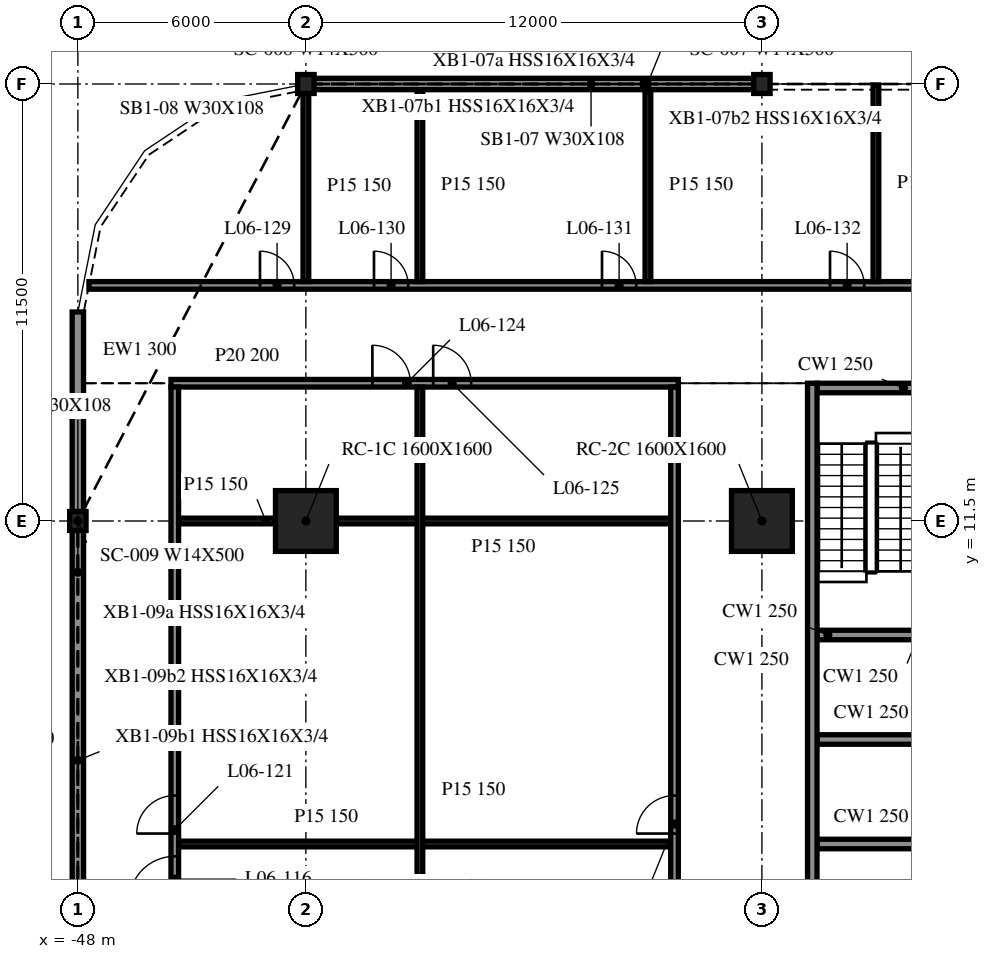
"""IFC4 building model, lengths in metres.
Left out: names, types, materials, properties, quantities, classifications, styles, units other than length and angle.
Written with IfcOpenShell. Run it as: python <this file> out.ifc"""

import sys

from ifc_helpers import new_model, si_unit, direction, frame, frame_2d, origin, origin_2d, place, context, subcontext, project, spatial, rectangle, i_section, extrude, element, fill, save


model = new_model("IFC4")
c1 = context("Model", 3, precision=1e-05, world=origin(), true_north=direction((0.0, 1.0)))
c2 = subcontext(c1, "Body", "Model", "MODEL_VIEW")
j1 = project(units=[si_unit("LENGTHUNIT", "METRE"), si_unit("PLANEANGLEUNIT", "RADIAN")], contexts=[c1])
p1 = place(None, origin())
s1 = spatial("IfcSite", under=j1, at=p1, CompositionType="ELEMENT")
p2 = place(p1, origin())
s2 = spatial("IfcBuilding", under=s1, at=p2, CompositionType="ELEMENT")
p3 = place(p2, frame((0.0, 0.0, 28.7)))
s3 = spatial("IfcBuildingStorey", under=s2, at=p3, CompositionType="ELEMENT", Elevation=28.7)
for number, where, z_axis, x_axis in (
    (1, (-42.0, 11.5, -0.34), (0.0, 0.0, 1.0), (1.0, 0.0, 0.0)),
    (2, (-30.0, 11.5, -0.34), (0.0, 0.0, 1.0), (1.0, 0.0, 0.0)),
):
    element("IfcColumn", number, at=place(p3, frame(where, z_axis=z_axis, x_axis=x_axis)), inside=s3, PredefinedType="COLUMN", context=c2, shape_type="SweptSolid", body=[
        extrude(rectangle(XDim=1.6, YDim=1.6, at=origin_2d()), origin(), (0.0, 0.0, 1.0), 4.3),
    ])
for number, where, z_axis, x_axis in (
    (3, (-30.0, 23.0, -0.34), (0.0, 0.0, 1.0), (1.0, 0.0, 0.0)),
    (4, (-42.0, 23.0, -0.34), (0.0, 0.0, 1.0), (1.0, 0.0, 0.0)),
    (5, (-48.0, 11.5, -0.34), (0.0, 0.0, 1.0), (1.0, 0.0, 0.0)),
):
    element("IfcColumn", number, at=place(p3, frame(where, z_axis=z_axis, x_axis=x_axis)), inside=s3, PredefinedType="COLUMN", context=c2, shape_type="SweptSolid", body=[
        extrude(i_section(OverallWidth=0.432, OverallDepth=0.498, WebThickness=0.056, FlangeThickness=0.089, at=origin_2d()), origin(), (0.0, 0.0, 1.0), 4.3),
    ])
p4 = place(p3, frame((-30.028, 23.0, 0.0), z_axis=(0.0, 0.0, 1.0), x_axis=(-1.0, 0.0, 0.0)))
e6 = element("IfcWall", 6, at=p4, inside=s3, PredefinedType="NOTDEFINED", context=c2, shape_type="SweptSolid", body=[
    extrude(rectangle(XDim=11.944, YDim=0.3, at=frame_2d((5.972, 0.0))), origin(), (0.0, 0.0, 1.0), 3.203),
])
p5 = place(p3, frame((-48.0, 17.0, 0.0), z_axis=(0.0, 0.0, 1.0), x_axis=(0.0, -1.0, 0.0)))
e7 = element("IfcWall", 7, at=p5, inside=s3, PredefinedType="NOTDEFINED", context=c2, shape_type="SweptSolid", body=[
    extrude(rectangle(XDim=5.251, YDim=0.3, at=frame_2d((2.625, 0.0))), origin(), (0.0, 0.0, 1.0), 3.203),
])
p6 = place(p3, frame((-48.0, 11.251, 0.0), z_axis=(0.0, 0.0, 1.0), x_axis=(0.0, -1.0, 0.0)))
e8 = element("IfcWall", 8, at=p6, inside=s3, PredefinedType="NOTDEFINED", context=c2, shape_type="SweptSolid", body=[
    extrude(rectangle(XDim=11.002, YDim=0.3, at=frame_2d((5.501, 0.0))), origin(), (0.0, 0.0, 1.0), 3.203),
])
p7 = place(p3, frame((-28.675, 15.125, 0.0), z_axis=(0.0, 0.0, 1.0), x_axis=(0.0, -1.0, 0.0)))
e9 = element("IfcWall", 9, at=p7, inside=s3, PredefinedType="SOLIDWALL", context=c2, shape_type="SweptSolid", body=[
    extrude(rectangle(XDim=24.25, YDim=0.25, at=frame_2d((12.125, 0.0))), origin(), (0.0, 0.0, 1.0), 3.96),
])
p8 = place(p3, frame((-28.55, 15.0, 0.0), z_axis=(0.0, 0.0, 1.0), x_axis=(1.0, 0.0, 0.0)))
e10 = element("IfcWall", 10, at=p8, inside=s3, PredefinedType="SOLIDWALL", context=c2, shape_type="SweptSolid", body=[
    extrude(rectangle(XDim=9.1, YDim=0.25, at=frame_2d((4.55, 0.0))), origin(), (0.0, 0.0, 1.0), 3.96),
])
p9 = place(p8, frame((3.65, 0.0, 0.0)))
e11 = element("IfcOpeningElement", 11, at=p9, cuts=e10, PredefinedType="OPENING", context=c2, shape_type="SweptSolid", body=[
    extrude(rectangle(XDim=1.8, YDim=2.1, at=frame_2d((0.9, 1.05))), frame((0.0, 0.135, 0.0), z_axis=(0.0, -1.0, 0.0), x_axis=(1.0, 0.0, 0.0)), (0.0, 0.0, 1.0), 0.27),
])
for number, where, z_axis, x_axis in (
    (12, (-28.55, 3.0, 0.0), (0.0, 0.0, 1.0), (1.0, 0.0, 0.0)),
    (13, (-28.55, 5.75, 0.0), (0.0, 0.0, 1.0), (1.0, 0.0, 0.0)),
    (14, (-28.55, 8.5, 0.0), (0.0, 0.0, 1.0), (1.0, 0.0, 0.0)),
):
    element("IfcWall", number, at=place(p3, frame(where, z_axis=z_axis, x_axis=x_axis)), inside=s3, PredefinedType="SOLIDWALL", context=c2, shape_type="SweptSolid", body=[
        extrude(rectangle(XDim=2.85, YDim=0.25, at=frame_2d((1.425, 0.0))), origin(), (0.0, 0.0, 1.0), 3.96),
    ])
p10 = place(p3, frame((-45.35, 3.0, 0.0), z_axis=(0.0, 0.0, 1.0), x_axis=(1.0, 0.0, 0.0)))
e15 = element("IfcWall", 15, at=p10, inside=s3, PredefinedType="PARTITIONING", context=c2, shape_type="SweptSolid", body=[
    extrude(rectangle(XDim=12.95, YDim=0.15, at=frame_2d((6.475, 0.0))), origin(), (0.0, 0.0, 1.0), 3.96),
])
p11 = place(p3, frame((-45.35, 11.5, 0.0), z_axis=(0.0, 0.0, 1.0), x_axis=(1.0, 0.0, 0.0)))
e16 = element("IfcWall", 16, at=p11, inside=s3, PredefinedType="PARTITIONING", context=c2, shape_type="SweptSolid", body=[
    extrude(rectangle(XDim=2.55, YDim=0.15, at=frame_2d((1.275, 0.0))), origin(), (0.0, 0.0, 1.0), 3.96),
])
p12 = place(p3, frame((-41.2, 11.5, 0.0), z_axis=(0.0, 0.0, 1.0), x_axis=(1.0, 0.0, 0.0)))
e17 = element("IfcWall", 17, at=p12, inside=s3, PredefinedType="PARTITIONING", context=c2, shape_type="SweptSolid", body=[
    extrude(rectangle(XDim=8.8, YDim=0.15, at=frame_2d((4.4, 0.0))), origin(), (0.0, 0.0, 1.0), 3.96),
])
p13 = place(p3, frame((-45.55, 15.125, 0.0), z_axis=(0.0, 0.0, 1.0), x_axis=(1.0, 0.0, 0.0)))
e18 = element("IfcWall", 18, at=p13, inside=s3, PredefinedType="PARTITIONING", context=c2, shape_type="SweptSolid", body=[
    extrude(rectangle(XDim=13.35, YDim=0.2, at=frame_2d((6.675, 0.0))), origin(), (0.0, 0.0, 1.0), 3.96),
])
p14 = place(p13, frame((5.3, 0.0, 0.0)))
e19 = element("IfcOpeningElement", 19, at=p14, cuts=e18, PredefinedType="OPENING", context=c2, shape_type="SweptSolid", body=[
    extrude(rectangle(XDim=1.0, YDim=2.1, at=frame_2d((0.5, 1.05))), frame((0.0, 0.11, 0.0), z_axis=(0.0, -1.0, 0.0), x_axis=(1.0, 0.0, 0.0)), (0.0, 0.0, 1.0), 0.22),
])
p15 = place(p13, frame((6.9, 0.0, 0.0)))
e20 = element("IfcOpeningElement", 20, at=p15, cuts=e18, PredefinedType="OPENING", context=c2, shape_type="SweptSolid", body=[
    extrude(rectangle(XDim=1.0, YDim=2.1, at=frame_2d((0.5, 1.05))), frame((0.0, 0.11, 0.0), z_axis=(0.0, -1.0, 0.0), x_axis=(1.0, 0.0, 0.0)), (0.0, 0.0, 1.0), 0.22),
])
p16 = place(p3, frame((-47.708, 17.7, 0.0), z_axis=(0.0, 0.0, 1.0), x_axis=(1.0, 0.0, 0.0)))
e21 = element("IfcWall", 21, at=p16, inside=s3, PredefinedType="PARTITIONING", context=c2, shape_type="SweptSolid", body=[
    extrude(rectangle(XDim=95.416, YDim=0.2, at=frame_2d((47.708, 0.0))), origin(), (0.0, 0.0, 1.0), 3.96),
])
p17 = place(p16, frame((4.5, 0.0, 0.0)))
e22 = element("IfcOpeningElement", 22, at=p17, cuts=e21, PredefinedType="OPENING", context=c2, shape_type="SweptSolid", body=[
    extrude(rectangle(XDim=0.9, YDim=2.1, at=frame_2d((0.45, 1.05))), frame((0.0, 0.11, 0.0), z_axis=(0.0, -1.0, 0.0), x_axis=(1.0, 0.0, 0.0)), (0.0, 0.0, 1.0), 0.22),
])
p18 = place(p16, frame((7.5, 0.0, 0.0)))
e23 = element("IfcOpeningElement", 23, at=p18, cuts=e21, PredefinedType="OPENING", context=c2, shape_type="SweptSolid", body=[
    extrude(rectangle(XDim=0.9, YDim=2.1, at=frame_2d((0.45, 1.05))), frame((0.0, 0.11, 0.0), z_axis=(0.0, -1.0, 0.0), x_axis=(1.0, 0.0, 0.0)), (0.0, 0.0, 1.0), 0.22),
])
p19 = place(p16, frame((13.5, 0.0, 0.0)))
e24 = element("IfcOpeningElement", 24, at=p19, cuts=e21, PredefinedType="OPENING", context=c2, shape_type="SweptSolid", body=[
    extrude(rectangle(XDim=0.9, YDim=2.1, at=frame_2d((0.45, 1.05))), frame((0.0, 0.11, 0.0), z_axis=(0.0, -1.0, 0.0), x_axis=(1.0, 0.0, 0.0)), (0.0, 0.0, 1.0), 0.22),
])
p20 = place(p16, frame((19.5, 0.0, 0.0)))
e25 = element("IfcOpeningElement", 25, at=p20, cuts=e21, PredefinedType="OPENING", context=c2, shape_type="SweptSolid", body=[
    extrude(rectangle(XDim=0.9, YDim=2.1, at=frame_2d((0.45, 1.05))), frame((0.0, 0.11, 0.0), z_axis=(0.0, -1.0, 0.0), x_axis=(1.0, 0.0, 0.0)), (0.0, 0.0, 1.0), 0.22),
])
p21 = place(p16, frame((28.5, 0.0, 0.0)))
e26 = element("IfcOpeningElement", 26, at=p21, cuts=e21, PredefinedType="OPENING", context=c2, shape_type="SweptSolid", body=[
    extrude(rectangle(XDim=0.9, YDim=2.1, at=frame_2d((0.45, 1.05))), frame((0.0, 0.11, 0.0), z_axis=(0.0, -1.0, 0.0), x_axis=(1.0, 0.0, 0.0)), (0.0, 0.0, 1.0), 0.22),
])
p22 = place(p16, frame((31.5, 0.0, 0.0)))
e27 = element("IfcOpeningElement", 27, at=p22, cuts=e21, PredefinedType="OPENING", context=c2, shape_type="SweptSolid", body=[
    extrude(rectangle(XDim=0.9, YDim=2.1, at=frame_2d((0.45, 1.05))), frame((0.0, 0.11, 0.0), z_axis=(0.0, -1.0, 0.0), x_axis=(1.0, 0.0, 0.0)), (0.0, 0.0, 1.0), 0.22),
])
p23 = place(p16, frame((34.5, 0.0, 0.0)))
e28 = element("IfcOpeningElement", 28, at=p23, cuts=e21, PredefinedType="OPENING", context=c2, shape_type="SweptSolid", body=[
    extrude(rectangle(XDim=0.9, YDim=2.1, at=frame_2d((0.45, 1.05))), frame((0.0, 0.11, 0.0), z_axis=(0.0, -1.0, 0.0), x_axis=(1.0, 0.0, 0.0)), (0.0, 0.0, 1.0), 0.22),
])
p24 = place(p16, frame((37.5, 0.0, 0.0)))
e29 = element("IfcOpeningElement", 29, at=p24, cuts=e21, PredefinedType="OPENING", context=c2, shape_type="SweptSolid", body=[
    extrude(rectangle(XDim=0.9, YDim=2.1, at=frame_2d((0.45, 1.05))), frame((0.0, 0.11, 0.0), z_axis=(0.0, -1.0, 0.0), x_axis=(1.0, 0.0, 0.0)), (0.0, 0.0, 1.0), 0.22),
])
p25 = place(p16, frame((43.5, 0.0, 0.0)))
e30 = element("IfcOpeningElement", 30, at=p25, cuts=e21, PredefinedType="OPENING", context=c2, shape_type="SweptSolid", body=[
    extrude(rectangle(XDim=0.9, YDim=2.1, at=frame_2d((0.45, 1.05))), frame((0.0, 0.11, 0.0), z_axis=(0.0, -1.0, 0.0), x_axis=(1.0, 0.0, 0.0)), (0.0, 0.0, 1.0), 0.22),
])
p26 = place(p16, frame((47.3, 0.0, 0.0)))
e31 = element("IfcOpeningElement", 31, at=p26, cuts=e21, PredefinedType="OPENING", context=c2, shape_type="SweptSolid", body=[
    extrude(rectangle(XDim=0.9, YDim=2.1, at=frame_2d((0.45, 1.05))), frame((0.0, 0.11, 0.0), z_axis=(0.0, -1.0, 0.0), x_axis=(1.0, 0.0, 0.0)), (0.0, 0.0, 1.0), 0.22),
])
p27 = place(p16, frame((51.1, 0.0, 0.0)))
e32 = element("IfcOpeningElement", 32, at=p27, cuts=e21, PredefinedType="OPENING", context=c2, shape_type="SweptSolid", body=[
    extrude(rectangle(XDim=0.9, YDim=2.1, at=frame_2d((0.45, 1.05))), frame((0.0, 0.11, 0.0), z_axis=(0.0, -1.0, 0.0), x_axis=(1.0, 0.0, 0.0)), (0.0, 0.0, 1.0), 0.22),
])
p28 = place(p16, frame((60.1, 0.0, 0.0)))
e33 = element("IfcOpeningElement", 33, at=p28, cuts=e21, PredefinedType="OPENING", context=c2, shape_type="SweptSolid", body=[
    extrude(rectangle(XDim=0.9, YDim=2.1, at=frame_2d((0.45, 1.05))), frame((0.0, 0.11, 0.0), z_axis=(0.0, -1.0, 0.0), x_axis=(1.0, 0.0, 0.0)), (0.0, 0.0, 1.0), 0.22),
])
p29 = place(p16, frame((63.1, 0.0, 0.0)))
e34 = element("IfcOpeningElement", 34, at=p29, cuts=e21, PredefinedType="OPENING", context=c2, shape_type="SweptSolid", body=[
    extrude(rectangle(XDim=0.9, YDim=2.1, at=frame_2d((0.45, 1.05))), frame((0.0, 0.11, 0.0), z_axis=(0.0, -1.0, 0.0), x_axis=(1.0, 0.0, 0.0)), (0.0, 0.0, 1.0), 0.22),
])
p30 = place(p16, frame((66.1, 0.0, 0.0)))
e35 = element("IfcOpeningElement", 35, at=p30, cuts=e21, PredefinedType="OPENING", context=c2, shape_type="SweptSolid", body=[
    extrude(rectangle(XDim=0.9, YDim=2.1, at=frame_2d((0.45, 1.05))), frame((0.0, 0.11, 0.0), z_axis=(0.0, -1.0, 0.0), x_axis=(1.0, 0.0, 0.0)), (0.0, 0.0, 1.0), 0.22),
])
p31 = place(p16, frame((69.1, 0.0, 0.0)))
e36 = element("IfcOpeningElement", 36, at=p31, cuts=e21, PredefinedType="OPENING", context=c2, shape_type="SweptSolid", body=[
    extrude(rectangle(XDim=0.9, YDim=2.1, at=frame_2d((0.45, 1.05))), frame((0.0, 0.11, 0.0), z_axis=(0.0, -1.0, 0.0), x_axis=(1.0, 0.0, 0.0)), (0.0, 0.0, 1.0), 0.22),
])
p32 = place(p16, frame((75.1, 0.0, 0.0)))
e37 = element("IfcOpeningElement", 37, at=p32, cuts=e21, PredefinedType="OPENING", context=c2, shape_type="SweptSolid", body=[
    extrude(rectangle(XDim=0.9, YDim=2.1, at=frame_2d((0.45, 1.05))), frame((0.0, 0.11, 0.0), z_axis=(0.0, -1.0, 0.0), x_axis=(1.0, 0.0, 0.0)), (0.0, 0.0, 1.0), 0.22),
])
p33 = place(p16, frame((81.1, 0.0, 0.0)))
e38 = element("IfcOpeningElement", 38, at=p33, cuts=e21, PredefinedType="OPENING", context=c2, shape_type="SweptSolid", body=[
    extrude(rectangle(XDim=0.9, YDim=2.1, at=frame_2d((0.45, 1.05))), frame((0.0, 0.11, 0.0), z_axis=(0.0, -1.0, 0.0), x_axis=(1.0, 0.0, 0.0)), (0.0, 0.0, 1.0), 0.22),
])
p34 = place(p16, frame((90.1, 0.0, 0.0)))
e39 = element("IfcOpeningElement", 39, at=p34, cuts=e21, PredefinedType="OPENING", context=c2, shape_type="SweptSolid", body=[
    extrude(rectangle(XDim=0.9, YDim=2.1, at=frame_2d((0.45, 1.05))), frame((0.0, 0.11, 0.0), z_axis=(0.0, -1.0, 0.0), x_axis=(1.0, 0.0, 0.0)), (0.0, 0.0, 1.0), 0.22),
])
p35 = place(p3, frame((-45.45, -9.025, 0.0), z_axis=(0.0, 0.0, 1.0), x_axis=(0.0, 1.0, 0.0)))
e40 = element("IfcWall", 40, at=p35, inside=s3, PredefinedType="PARTITIONING", context=c2, shape_type="SweptSolid", body=[
    extrude(rectangle(XDim=24.05, YDim=0.2, at=frame_2d((12.025, 0.0))), origin(), (0.0, 0.0, 1.0), 3.96),
])
p36 = place(p35, frame((10.5, 0.0, 0.0)))
e41 = element("IfcOpeningElement", 41, at=p36, cuts=e40, PredefinedType="OPENING", context=c2, shape_type="SweptSolid", body=[
    extrude(rectangle(XDim=1.2, YDim=2.1, at=frame_2d((0.6, 1.05))), frame((0.0, 0.11, 0.0), z_axis=(0.0, -1.0, 0.0), x_axis=(1.0, 0.0, 0.0)), (0.0, 0.0, 1.0), 0.22),
])
p37 = place(p35, frame((12.3, 0.0, 0.0)))
e42 = element("IfcOpeningElement", 42, at=p37, cuts=e40, PredefinedType="OPENING", context=c2, shape_type="SweptSolid", body=[
    extrude(rectangle(XDim=1.0, YDim=2.1, at=frame_2d((0.5, 1.05))), frame((0.0, 0.11, 0.0), z_axis=(0.0, -1.0, 0.0), x_axis=(1.0, 0.0, 0.0)), (0.0, 0.0, 1.0), 0.22),
])
p38 = place(p3, frame((-42.0, 17.8, 0.0), z_axis=(0.0, 0.0, 1.0), x_axis=(0.0, 1.0, 0.0)))
e43 = element("IfcWall", 43, at=p38, inside=s3, PredefinedType="PARTITIONING", context=c2, shape_type="SweptSolid", body=[
    extrude(rectangle(XDim=5.047, YDim=0.15, at=frame_2d((2.523, 0.0))), origin(), (0.0, 0.0, 1.0), 3.96),
])
p39 = place(p3, frame((-39.0, -9.025, 0.0), z_axis=(0.0, 0.0, 1.0), x_axis=(0.0, 1.0, 0.0)))
e44 = element("IfcWall", 44, at=p39, inside=s3, PredefinedType="PARTITIONING", context=c2, shape_type="SweptSolid", body=[
    extrude(rectangle(XDim=24.05, YDim=0.15, at=frame_2d((12.025, 0.0))), origin(), (0.0, 0.0, 1.0), 3.96),
])
for number, where, z_axis, x_axis in (
    (45, (-39.0, 17.8, 0.0), (0.0, 0.0, 1.0), (0.0, 1.0, 0.0)),
    (46, (-33.0, 17.8, 0.0), (0.0, 0.0, 1.0), (0.0, 1.0, 0.0)),
):
    element("IfcWall", number, at=place(p3, frame(where, z_axis=z_axis, x_axis=x_axis)), inside=s3, PredefinedType="PARTITIONING", context=c2, shape_type="SweptSolid", body=[
        extrude(rectangle(XDim=5.05, YDim=0.15, at=frame_2d((2.525, 0.0))), origin(), (0.0, 0.0, 1.0), 3.96),
    ])
p40 = place(p3, frame((-32.3, -9.025, 0.0), z_axis=(0.0, 0.0, 1.0), x_axis=(0.0, 1.0, 0.0)))
e47 = element("IfcWall", 47, at=p40, inside=s3, PredefinedType="PARTITIONING", context=c2, shape_type="SweptSolid", body=[
    extrude(rectangle(XDim=24.05, YDim=0.2, at=frame_2d((12.025, 0.0))), origin(), (0.0, 0.0, 1.0), 3.96),
])
p41 = place(p40, frame((12.3, 0.0, 0.0)))
e48 = element("IfcOpeningElement", 48, at=p41, cuts=e47, PredefinedType="OPENING", context=c2, shape_type="SweptSolid", body=[
    extrude(rectangle(XDim=1.0, YDim=2.1, at=frame_2d((0.5, 1.05))), frame((0.0, 0.11, 0.0), z_axis=(0.0, -1.0, 0.0), x_axis=(1.0, 0.0, 0.0)), (0.0, 0.0, 1.0), 0.22),
])
p42 = place(p3, frame((-27.0, 17.8, 0.0), z_axis=(0.0, 0.0, 1.0), x_axis=(0.0, 1.0, 0.0)))
e49 = element("IfcWall", 49, at=p42, inside=s3, PredefinedType="PARTITIONING", context=c2, shape_type="SweptSolid", body=[
    extrude(rectangle(XDim=5.175, YDim=0.15, at=frame_2d((2.587, 0.0))), origin(), (0.0, 0.0, 1.0), 3.96),
])
p43 = place(p36, origin())
e50 = element("IfcDoor", 50, at=p43, inside=s3, OperationType="SINGLE_SWING_RIGHT", PredefinedType="DOOR", context=c2, shape_type="SweptSolid", body=[
    extrude(rectangle(XDim=1.2, YDim=2.1, at=frame_2d((0.6, 1.05))), frame((0.0, 0.025, 0.0), z_axis=(0.0, -1.0, 0.0), x_axis=(1.0, 0.0, 0.0)), (0.0, 0.0, 1.0), 0.05),
])
fill(e41, e50)
p44 = place(p37, origin())
e51 = element("IfcDoor", 51, at=p44, inside=s3, OperationType="SINGLE_SWING_LEFT", PredefinedType="DOOR", context=c2, shape_type="SweptSolid", body=[
    extrude(rectangle(XDim=1.0, YDim=2.1, at=frame_2d((0.5, 1.05))), frame((0.0, 0.025, 0.0), z_axis=(0.0, -1.0, 0.0), x_axis=(1.0, 0.0, 0.0)), (0.0, 0.0, 1.0), 0.05),
])
fill(e42, e51)
p45 = place(p41, origin())
e52 = element("IfcDoor", 52, at=p45, inside=s3, OperationType="SINGLE_SWING_RIGHT", PredefinedType="DOOR", context=c2, shape_type="SweptSolid", body=[
    extrude(rectangle(XDim=1.0, YDim=2.1, at=frame_2d((0.5, 1.05))), frame((0.0, 0.025, 0.0), z_axis=(0.0, -1.0, 0.0), x_axis=(1.0, 0.0, 0.0)), (0.0, 0.0, 1.0), 0.05),
])
fill(e48, e52)
p46 = place(p14, origin())
e53 = element("IfcDoor", 53, at=p46, inside=s3, OperationType="SINGLE_SWING_RIGHT", PredefinedType="DOOR", context=c2, shape_type="SweptSolid", body=[
    extrude(rectangle(XDim=1.0, YDim=2.1, at=frame_2d((0.5, 1.05))), frame((0.0, 0.025, 0.0), z_axis=(0.0, -1.0, 0.0), x_axis=(1.0, 0.0, 0.0)), (0.0, 0.0, 1.0), 0.05),
])
fill(e19, e53)
p47 = place(p15, origin())
e54 = element("IfcDoor", 54, at=p47, inside=s3, OperationType="SINGLE_SWING_LEFT", PredefinedType="DOOR", context=c2, shape_type="SweptSolid", body=[
    extrude(rectangle(XDim=1.0, YDim=2.1, at=frame_2d((0.5, 1.05))), frame((0.0, 0.025, 0.0), z_axis=(0.0, -1.0, 0.0), x_axis=(1.0, 0.0, 0.0)), (0.0, 0.0, 1.0), 0.05),
])
fill(e20, e54)
p48 = place(p17, origin())
e55 = element("IfcDoor", 55, at=p48, inside=s3, OperationType="SINGLE_SWING_LEFT", PredefinedType="DOOR", context=c2, shape_type="SweptSolid", body=[
    extrude(rectangle(XDim=0.9, YDim=2.1, at=frame_2d((0.45, 1.05))), frame((0.0, 0.025, 0.0), z_axis=(0.0, -1.0, 0.0), x_axis=(1.0, 0.0, 0.0)), (0.0, 0.0, 1.0), 0.05),
])
fill(e22, e55)
p49 = place(p18, origin())
e56 = element("IfcDoor", 56, at=p49, inside=s3, OperationType="SINGLE_SWING_LEFT", PredefinedType="DOOR", context=c2, shape_type="SweptSolid", body=[
    extrude(rectangle(XDim=0.9, YDim=2.1, at=frame_2d((0.45, 1.05))), frame((0.0, 0.025, 0.0), z_axis=(0.0, -1.0, 0.0), x_axis=(1.0, 0.0, 0.0)), (0.0, 0.0, 1.0), 0.05),
])
fill(e23, e56)
p50 = place(p19, origin())
e57 = element("IfcDoor", 57, at=p50, inside=s3, OperationType="SINGLE_SWING_LEFT", PredefinedType="DOOR", context=c2, shape_type="SweptSolid", body=[
    extrude(rectangle(XDim=0.9, YDim=2.1, at=frame_2d((0.45, 1.05))), frame((0.0, 0.025, 0.0), z_axis=(0.0, -1.0, 0.0), x_axis=(1.0, 0.0, 0.0)), (0.0, 0.0, 1.0), 0.05),
])
fill(e24, e57)
p51 = place(p20, origin())
e58 = element("IfcDoor", 58, at=p51, inside=s3, OperationType="SINGLE_SWING_LEFT", PredefinedType="DOOR", context=c2, shape_type="SweptSolid", body=[
    extrude(rectangle(XDim=0.9, YDim=2.1, at=frame_2d((0.45, 1.05))), frame((0.0, 0.025, 0.0), z_axis=(0.0, -1.0, 0.0), x_axis=(1.0, 0.0, 0.0)), (0.0, 0.0, 1.0), 0.05),
])
fill(e25, e58)
save(model, sys.argv[1])
